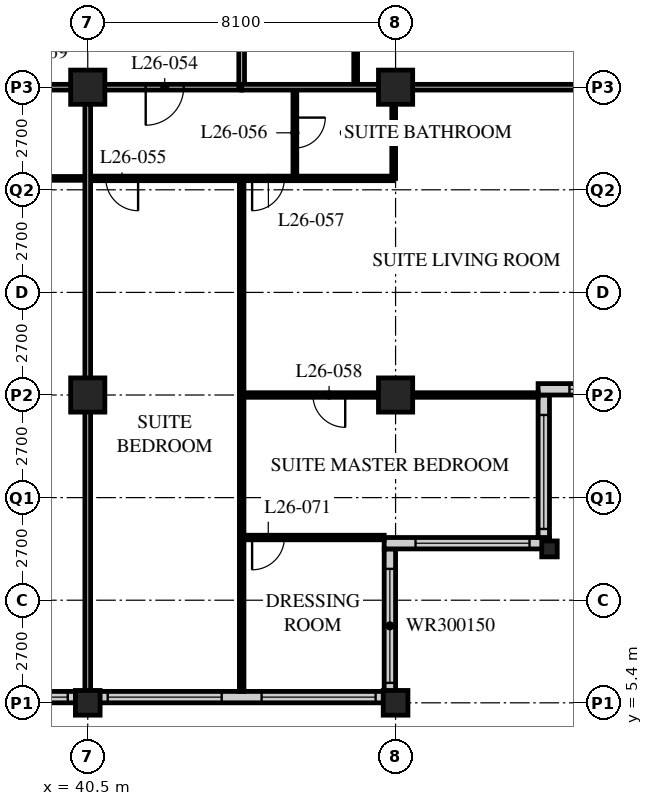
"""IFC4 building model, lengths in metres.
Left out: names, types, materials, properties, quantities, classifications, styles, units other than length and angle.
Written with IfcOpenShell. Run it as: python <this file> out.ifc"""

import sys

from ifc_helpers import new_model, si_unit, direction, frame, frame_2d, origin, origin_2d, place, context, subcontext, project, spatial, rectangle, hollow_rectangle, i_section, extrude, element, fill, save


model = new_model("IFC4")
c1 = context("Model", 3, precision=1e-05, world=origin(), true_north=direction((0.0, 1.0)))
c2 = subcontext(c1, "Body", "Model", "MODEL_VIEW")
j1 = project(units=[si_unit("LENGTHUNIT", "METRE"), si_unit("PLANEANGLEUNIT", "RADIAN")], contexts=[c1])
p1 = place(None, origin())
s1 = spatial("IfcSite", under=j1, at=p1, CompositionType="ELEMENT")
p2 = place(p1, origin())
s2 = spatial("IfcBuilding", under=s1, at=p2, CompositionType="ELEMENT")
p3 = place(p2, frame((0.0, 0.0, 106.8)))
s3 = spatial("IfcBuildingStorey", under=s2, at=p3, CompositionType="ELEMENT", Elevation=106.8)
p4 = place(p3, frame((40.5, 5.4, 0.0), z_axis=(0.0, 0.0, 1.0), x_axis=(1.0, 0.0, 0.0)))
e1 = element("IfcColumn", 1, at=p4, inside=s3, PredefinedType="COLUMN", context=c2, shape_type="SweptSolid", body=[
    extrude(hollow_rectangle(XDim=0.65, YDim=0.65, WallThickness=0.055, at=origin_2d()), origin(), (0.0, 0.0, 1.0), 3.4),
])
for number, where, z_axis, x_axis in (
    (2, (40.5, 13.5, 0.0), (0.0, 0.0, 1.0), (1.0, 0.0, 0.0)),
    (3, (40.5, 21.6, 0.0), (0.0, 0.0, 1.0), (1.0, 0.0, 0.0)),
):
    element("IfcColumn", number, at=place(p3, frame(where, z_axis=z_axis, x_axis=x_axis)), inside=s3, PredefinedType="COLUMN", context=c2, shape_type="SweptSolid", body=[
        extrude(hollow_rectangle(XDim=0.9, YDim=0.9, WallThickness=0.09, at=origin_2d()), origin(), (0.0, 0.0, 1.0), 3.4),
    ])
p5 = place(p3, frame((48.6, 5.4, 0.0), z_axis=(0.0, 0.0, 1.0), x_axis=(1.0, 0.0, 0.0)))
e4 = element("IfcColumn", 4, at=p5, inside=s3, PredefinedType="COLUMN", context=c2, shape_type="SweptSolid", body=[
    extrude(hollow_rectangle(XDim=0.65, YDim=0.65, WallThickness=0.055, at=origin_2d()), origin(), (0.0, 0.0, 1.0), 3.4),
])
for number, where, z_axis, x_axis in (
    (5, (48.6, 13.5, 0.0), (0.0, 0.0, 1.0), (1.0, 0.0, 0.0)),
    (6, (48.6, 21.6, 0.0), (0.0, 0.0, 1.0), (1.0, 0.0, 0.0)),
):
    element("IfcColumn", number, at=place(p3, frame(where, z_axis=z_axis, x_axis=x_axis)), inside=s3, PredefinedType="COLUMN", context=c2, shape_type="SweptSolid", body=[
        extrude(hollow_rectangle(XDim=0.9, YDim=0.9, WallThickness=0.09, at=origin_2d()), origin(), (0.0, 0.0, 1.0), 3.4),
    ])
p6 = place(p3, frame((52.65, 9.45, 0.0), z_axis=(0.0, 0.0, 1.0), x_axis=(1.0, 0.0, 0.0)))
e7 = element("IfcColumn", 7, at=p6, inside=s3, PredefinedType="COLUMN", context=c2, shape_type="SweptSolid", body=[
    extrude(i_section(OverallWidth=0.407, OverallDepth=0.419, WebThickness=0.031, FlangeThickness=0.049, FilletRadius=0.015, at=origin_2d()), origin(), (0.0, 0.0, 1.0), 3.4),
])
p7 = place(p3, frame((8.4, 5.55, 0.0), z_axis=(0.0, 0.0, 1.0), x_axis=(1.0, 0.0, 0.0)))
e8 = element("IfcWall", 8, at=p7, inside=s3, PredefinedType="SOLIDWALL", context=c2, shape_type="SweptSolid", body=[
    extrude(rectangle(XDim=40.2, YDim=0.3, at=frame_2d((20.1, 0.0))), origin(), (0.0, 0.0, 1.0), 3.19),
])
p8 = place(p7, frame((0.225, 0.0, 0.9)))
e9 = element("IfcOpeningElement", 9, at=p8, cuts=e8, PredefinedType="OPENING", context=c2, shape_type="SweptSolid", body=[
    extrude(rectangle(XDim=3.0, YDim=2.0, at=frame_2d((1.5, 1.0))), frame((0.0, 0.16, 0.0), z_axis=(0.0, -1.0, 0.0), x_axis=(1.0, 0.0, 0.0)), (0.0, 0.0, 1.0), 0.32),
])
p9 = place(p7, frame((4.275, 0.0, 0.9)))
e10 = element("IfcOpeningElement", 10, at=p9, cuts=e8, PredefinedType="OPENING", context=c2, shape_type="SweptSolid", body=[
    extrude(rectangle(XDim=3.0, YDim=2.0, at=frame_2d((1.5, 1.0))), frame((0.0, 0.16, 0.0), z_axis=(0.0, -1.0, 0.0), x_axis=(1.0, 0.0, 0.0)), (0.0, 0.0, 1.0), 0.32),
])
p10 = place(p7, frame((8.325, 0.0, 0.9)))
e11 = element("IfcOpeningElement", 11, at=p10, cuts=e8, PredefinedType="OPENING", context=c2, shape_type="SweptSolid", body=[
    extrude(rectangle(XDim=3.0, YDim=2.0, at=frame_2d((1.5, 1.0))), frame((0.0, 0.16, 0.0), z_axis=(0.0, -1.0, 0.0), x_axis=(1.0, 0.0, 0.0)), (0.0, 0.0, 1.0), 0.32),
])
p11 = place(p7, frame((12.375, 0.0, 0.9)))
e12 = element("IfcOpeningElement", 12, at=p11, cuts=e8, PredefinedType="OPENING", context=c2, shape_type="SweptSolid", body=[
    extrude(rectangle(XDim=3.0, YDim=2.0, at=frame_2d((1.5, 1.0))), frame((0.0, 0.16, 0.0), z_axis=(0.0, -1.0, 0.0), x_axis=(1.0, 0.0, 0.0)), (0.0, 0.0, 1.0), 0.32),
])
p12 = place(p7, frame((16.425, 0.0, 0.9)))
e13 = element("IfcOpeningElement", 13, at=p12, cuts=e8, PredefinedType="OPENING", context=c2, shape_type="SweptSolid", body=[
    extrude(rectangle(XDim=3.0, YDim=2.0, at=frame_2d((1.5, 1.0))), frame((0.0, 0.16, 0.0), z_axis=(0.0, -1.0, 0.0), x_axis=(1.0, 0.0, 0.0)), (0.0, 0.0, 1.0), 0.32),
])
p13 = place(p7, frame((20.475, 0.0, 0.9)))
e14 = element("IfcOpeningElement", 14, at=p13, cuts=e8, PredefinedType="OPENING", context=c2, shape_type="SweptSolid", body=[
    extrude(rectangle(XDim=3.0, YDim=2.0, at=frame_2d((1.5, 1.0))), frame((0.0, 0.16, 0.0), z_axis=(0.0, -1.0, 0.0), x_axis=(1.0, 0.0, 0.0)), (0.0, 0.0, 1.0), 0.32),
])
p14 = place(p7, frame((24.525, 0.0, 0.9)))
e15 = element("IfcOpeningElement", 15, at=p14, cuts=e8, PredefinedType="OPENING", context=c2, shape_type="SweptSolid", body=[
    extrude(rectangle(XDim=3.0, YDim=2.0, at=frame_2d((1.5, 1.0))), frame((0.0, 0.16, 0.0), z_axis=(0.0, -1.0, 0.0), x_axis=(1.0, 0.0, 0.0)), (0.0, 0.0, 1.0), 0.32),
])
p15 = place(p7, frame((28.575, 0.0, 0.9)))
e16 = element("IfcOpeningElement", 16, at=p15, cuts=e8, PredefinedType="OPENING", context=c2, shape_type="SweptSolid", body=[
    extrude(rectangle(XDim=3.0, YDim=2.0, at=frame_2d((1.5, 1.0))), frame((0.0, 0.16, 0.0), z_axis=(0.0, -1.0, 0.0), x_axis=(1.0, 0.0, 0.0)), (0.0, 0.0, 1.0), 0.32),
])
p16 = place(p7, frame((32.625, 0.0, 0.9)))
e17 = element("IfcOpeningElement", 17, at=p16, cuts=e8, PredefinedType="OPENING", context=c2, shape_type="SweptSolid", body=[
    extrude(rectangle(XDim=3.0, YDim=2.0, at=frame_2d((1.5, 1.0))), frame((0.0, 0.16, 0.0), z_axis=(0.0, -1.0, 0.0), x_axis=(1.0, 0.0, 0.0)), (0.0, 0.0, 1.0), 0.32),
])
p17 = place(p7, frame((36.675, 0.0, 0.9)))
e18 = element("IfcOpeningElement", 18, at=p17, cuts=e8, PredefinedType="OPENING", context=c2, shape_type="SweptSolid", body=[
    extrude(rectangle(XDim=3.0, YDim=2.0, at=frame_2d((1.5, 1.0))), frame((0.0, 0.16, 0.0), z_axis=(0.0, -1.0, 0.0), x_axis=(1.0, 0.0, 0.0)), (0.0, 0.0, 1.0), 0.32),
])
p18 = place(p3, frame((48.45, 5.7, 0.0), z_axis=(0.0, 0.0, 1.0), x_axis=(0.0, 1.0, 0.0)))
e19 = element("IfcWall", 19, at=p18, inside=s3, PredefinedType="SOLIDWALL", context=c2, shape_type="SweptSolid", body=[
    extrude(rectangle(XDim=3.75, YDim=0.3, at=frame_2d((1.875, 0.0))), origin(), (0.0, 0.0, 1.0), 3.19),
])
p19 = place(p18, frame((0.225, 0.0, 0.9)))
e20 = element("IfcOpeningElement", 20, at=p19, cuts=e19, PredefinedType="OPENING", context=c2, shape_type="SweptSolid", body=[
    extrude(rectangle(XDim=3.0, YDim=1.5, at=frame_2d((1.5, 0.75))), frame((0.0, 0.16, 0.0), z_axis=(0.0, -1.0, 0.0), x_axis=(1.0, 0.0, 0.0)), (0.0, 0.0, 1.0), 0.32),
])
p20 = place(p3, frame((48.3, 9.6, 0.0), z_axis=(0.0, 0.0, 1.0), x_axis=(1.0, 0.0, 0.0)))
e21 = element("IfcWall", 21, at=p20, inside=s3, PredefinedType="SOLIDWALL", context=c2, shape_type="SweptSolid", body=[
    extrude(rectangle(XDim=4.35, YDim=0.3, at=frame_2d((2.175, 0.0))), origin(), (0.0, 0.0, 1.0), 3.19),
])
p21 = place(p20, frame((0.825, 0.0, 0.9)))
e22 = element("IfcOpeningElement", 22, at=p21, cuts=e21, PredefinedType="OPENING", context=c2, shape_type="SweptSolid", body=[
    extrude(rectangle(XDim=3.0, YDim=1.5, at=frame_2d((1.5, 0.75))), frame((0.0, 0.16, 0.0), z_axis=(0.0, -1.0, 0.0), x_axis=(1.0, 0.0, 0.0)), (0.0, 0.0, 1.0), 0.32),
])
p22 = place(p3, frame((52.5, 9.75, 0.0), z_axis=(0.0, 0.0, 1.0), x_axis=(0.0, 1.0, 0.0)))
e23 = element("IfcWall", 23, at=p22, inside=s3, PredefinedType="SOLIDWALL", context=c2, shape_type="SweptSolid", body=[
    extrude(rectangle(XDim=3.75, YDim=0.3, at=frame_2d((1.875, 0.0))), origin(), (0.0, 0.0, 1.0), 3.19),
])
p23 = place(p22, frame((0.225, 0.0, 0.9)))
e24 = element("IfcOpeningElement", 24, at=p23, cuts=e23, PredefinedType="OPENING", context=c2, shape_type="SweptSolid", body=[
    extrude(rectangle(XDim=3.0, YDim=1.5, at=frame_2d((1.5, 0.75))), frame((0.0, 0.16, 0.0), z_axis=(0.0, -1.0, 0.0), x_axis=(1.0, 0.0, 0.0)), (0.0, 0.0, 1.0), 0.32),
])
p24 = place(p3, frame((52.35, 13.65, 0.0), z_axis=(0.0, 0.0, 1.0), x_axis=(1.0, 0.0, 0.0)))
e25 = element("IfcWall", 25, at=p24, inside=s3, PredefinedType="SOLIDWALL", context=c2, shape_type="SweptSolid", body=[
    extrude(rectangle(XDim=4.35, YDim=0.3, at=frame_2d((2.175, 0.0))), origin(), (0.0, 0.0, 1.0), 3.19),
])
p25 = place(p24, frame((0.825, 0.0, 0.9)))
e26 = element("IfcOpeningElement", 26, at=p25, cuts=e25, PredefinedType="OPENING", context=c2, shape_type="SweptSolid", body=[
    extrude(rectangle(XDim=3.0, YDim=1.5, at=frame_2d((1.5, 0.75))), frame((0.0, 0.16, 0.0), z_axis=(0.0, -1.0, 0.0), x_axis=(1.0, 0.0, 0.0)), (0.0, 0.0, 1.0), 0.32),
])
p26 = place(p3, frame((12.15, 21.6, 0.0), z_axis=(0.0, 0.0, 1.0), x_axis=(1.0, 0.0, 0.0)))
e27 = element("IfcWall", 27, at=p26, inside=s3, PredefinedType="PARTITIONING", context=c2, shape_type="SweptSolid", body=[
    extrude(rectangle(XDim=32.4, YDim=0.15, at=frame_2d((16.2, 0.0))), origin(), (0.0, 0.0, 1.0), 2.578),
])
p27 = place(p26, frame((5.95, 0.0, 0.0)))
e28 = element("IfcOpeningElement", 28, at=p27, cuts=e27, PredefinedType="OPENING", context=c2, shape_type="SweptSolid", body=[
    extrude(rectangle(XDim=1.0, YDim=2.1, at=frame_2d((0.5, 1.05))), frame((0.0, 0.085, 0.0), z_axis=(0.0, -1.0, 0.0), x_axis=(1.0, 0.0, 0.0)), (0.0, 0.0, 1.0), 0.17),
])
p28 = place(p26, frame((14.05, 0.0, 0.0)))
e29 = element("IfcOpeningElement", 29, at=p28, cuts=e27, PredefinedType="OPENING", context=c2, shape_type="SweptSolid", body=[
    extrude(rectangle(XDim=1.0, YDim=2.1, at=frame_2d((0.5, 1.05))), frame((0.0, 0.085, 0.0), z_axis=(0.0, -1.0, 0.0), x_axis=(1.0, 0.0, 0.0)), (0.0, 0.0, 1.0), 0.17),
])
p29 = place(p26, frame((22.15, 0.0, 0.0)))
e30 = element("IfcOpeningElement", 30, at=p29, cuts=e27, PredefinedType="OPENING", context=c2, shape_type="SweptSolid", body=[
    extrude(rectangle(XDim=1.0, YDim=2.1, at=frame_2d((0.5, 1.05))), frame((0.0, 0.085, 0.0), z_axis=(0.0, -1.0, 0.0), x_axis=(1.0, 0.0, 0.0)), (0.0, 0.0, 1.0), 0.17),
])
p30 = place(p26, frame((1.525, 0.0, 0.0)))
e31 = element("IfcOpeningElement", 31, at=p30, cuts=e27, PredefinedType="OPENING", context=c2, shape_type="SweptSolid", body=[
    extrude(rectangle(XDim=1.0, YDim=2.1, at=frame_2d((0.5, 1.05))), frame((0.0, 0.085, 0.0), z_axis=(0.0, -1.0, 0.0), x_axis=(1.0, 0.0, 0.0)), (0.0, 0.0, 1.0), 0.17),
])
p31 = place(p26, frame((29.875, 0.0, 0.0)))
e32 = element("IfcOpeningElement", 32, at=p31, cuts=e27, PredefinedType="OPENING", context=c2, shape_type="SweptSolid", body=[
    extrude(rectangle(XDim=1.0, YDim=2.1, at=frame_2d((0.5, 1.05))), frame((0.0, 0.085, 0.0), z_axis=(0.0, -1.0, 0.0), x_axis=(1.0, 0.0, 0.0)), (0.0, 0.0, 1.0), 0.17),
])
p32 = place(p3, frame((44.55, 21.6, 0.0), z_axis=(0.0, 0.0, 1.0), x_axis=(0.0, 1.0, 0.0)))
e33 = element("IfcWall", 33, at=p32, inside=s3, PredefinedType="PARTITIONING", context=c2, shape_type="SweptSolid", body=[
    extrude(rectangle(XDim=24.3, YDim=0.15, at=frame_2d((12.15, 0.0))), origin(), (0.0, 0.0, 1.0), 3.19),
])
p33 = place(p32, frame((2.75, 0.0, 0.0)))
e34 = element("IfcOpeningElement", 34, at=p33, cuts=e33, PredefinedType="OPENING", context=c2, shape_type="SweptSolid", body=[
    extrude(rectangle(XDim=1.0, YDim=2.1, at=frame_2d((0.5, 1.05))), frame((0.0, 0.085, 0.0), z_axis=(0.0, -1.0, 0.0), x_axis=(1.0, 0.0, 0.0)), (0.0, 0.0, 1.0), 0.17),
])
p34 = place(p32, frame((6.5, 0.0, 0.0)))
e35 = element("IfcOpeningElement", 35, at=p34, cuts=e33, PredefinedType="OPENING", context=c2, shape_type="SweptSolid", body=[
    extrude(rectangle(XDim=1.0, YDim=2.1, at=frame_2d((0.5, 1.05))), frame((0.0, 0.085, 0.0), z_axis=(0.0, -1.0, 0.0), x_axis=(1.0, 0.0, 0.0)), (0.0, 0.0, 1.0), 0.17),
])
p35 = place(p32, frame((13.55, 0.0, 0.0)))
e36 = element("IfcOpeningElement", 36, at=p35, cuts=e33, PredefinedType="OPENING", context=c2, shape_type="SweptSolid", body=[
    extrude(rectangle(XDim=1.0, YDim=2.1, at=frame_2d((0.5, 1.05))), frame((0.0, 0.085, 0.0), z_axis=(0.0, -1.0, 0.0), x_axis=(1.0, 0.0, 0.0)), (0.0, 0.0, 1.0), 0.17),
])
p36 = place(p32, frame((21.65, 0.0, 0.0)))
e37 = element("IfcOpeningElement", 37, at=p36, cuts=e33, PredefinedType="OPENING", context=c2, shape_type="SweptSolid", body=[
    extrude(rectangle(XDim=1.0, YDim=2.1, at=frame_2d((0.5, 1.05))), frame((0.0, 0.085, 0.0), z_axis=(0.0, -1.0, 0.0), x_axis=(1.0, 0.0, 0.0)), (0.0, 0.0, 1.0), 0.17),
])
p37 = place(p3, frame((37.9, 19.2, 0.0), z_axis=(0.0, 0.0, 1.0), x_axis=(1.0, 0.0, 0.0)))
e38 = element("IfcWall", 38, at=p37, inside=s3, PredefinedType="PARTITIONING", context=c2, shape_type="SweptSolid", body=[
    extrude(rectangle(XDim=2.6, YDim=0.1, at=frame_2d((1.3, 0.0))), origin(), (0.0, 0.0, 1.0), 3.19),
])
p38 = place(p3, frame((47.55, 21.6, 0.0), z_axis=(0.0, 0.0, 1.0), x_axis=(0.0, 1.0, 0.0)))
e39 = element("IfcWall", 39, at=p38, inside=s3, PredefinedType="PARTITIONING", context=c2, shape_type="SweptSolid", body=[
    extrude(rectangle(XDim=2.6, YDim=0.1, at=frame_2d((1.3, 0.0))), origin(), (0.0, 0.0, 1.0), 3.19),
])
p39 = place(p3, frame((40.5, 19.2, 0.0), z_axis=(0.0, 0.0, 1.0), x_axis=(1.0, 0.0, 0.0)))
e40 = element("IfcWall", 40, at=p39, inside=s3, PredefinedType="PARTITIONING", context=c2, shape_type="SweptSolid", body=[
    extrude(rectangle(XDim=8.05, YDim=0.12, at=frame_2d((4.025, 0.0))), origin(), (0.0, 0.0, 1.0), 3.19),
])
p40 = place(p39, frame((0.475, 0.0, 0.0)))
e41 = element("IfcOpeningElement", 41, at=p40, cuts=e40, PredefinedType="OPENING", context=c2, shape_type="SweptSolid", body=[
    extrude(rectangle(XDim=0.85, YDim=2.1, at=frame_2d((0.425, 1.05))), frame((0.0, 0.07, 0.0), z_axis=(0.0, -1.0, 0.0), x_axis=(1.0, 0.0, 0.0)), (0.0, 0.0, 1.0), 0.14),
])
p41 = place(p39, frame((4.325, 0.0, 0.0)))
e42 = element("IfcOpeningElement", 42, at=p41, cuts=e40, PredefinedType="OPENING", context=c2, shape_type="SweptSolid", body=[
    extrude(rectangle(XDim=0.85, YDim=2.1, at=frame_2d((0.425, 1.05))), frame((0.0, 0.07, 0.0), z_axis=(0.0, -1.0, 0.0), x_axis=(1.0, 0.0, 0.0)), (0.0, 0.0, 1.0), 0.14),
])
p42 = place(p3, frame((45.95, 21.6, 0.0), z_axis=(0.0, 0.0, 1.0), x_axis=(0.0, -1.0, 0.0)))
e43 = element("IfcWall", 43, at=p42, inside=s3, PredefinedType="PARTITIONING", context=c2, shape_type="SweptSolid", body=[
    extrude(rectangle(XDim=2.4, YDim=0.1, at=frame_2d((1.2, 0.0))), origin(), (0.0, 0.0, 1.0), 3.19),
])
p43 = place(p42, frame((0.8, 0.0, 0.0)))
e44 = element("IfcOpeningElement", 44, at=p43, cuts=e43, PredefinedType="OPENING", context=c2, shape_type="SweptSolid", body=[
    extrude(rectangle(XDim=0.8, YDim=2.1, at=frame_2d((0.4, 1.05))), frame((0.0, 0.06, 0.0), z_axis=(0.0, -1.0, 0.0), x_axis=(1.0, 0.0, 0.0)), (0.0, 0.0, 1.0), 0.12),
])
p44 = place(p3, frame((48.55, 21.6, 0.0), z_axis=(0.0, 0.0, 1.0), x_axis=(0.0, -1.0, 0.0)))
e45 = element("IfcWall", 45, at=p44, inside=s3, PredefinedType="PARTITIONING", context=c2, shape_type="SweptSolid", body=[
    extrude(rectangle(XDim=2.4, YDim=0.1, at=frame_2d((1.2, 0.0))), origin(), (0.0, 0.0, 1.0), 2.578),
])
p45 = place(p3, frame((44.55, 19.2, 0.0), z_axis=(0.0, 0.0, 1.0), x_axis=(0.0, -1.0, 0.0)))
e46 = element("IfcWall", 46, at=p45, inside=s3, PredefinedType="PARTITIONING", context=c2, shape_type="SweptSolid", body=[
    extrude(rectangle(XDim=13.5, YDim=0.12, at=frame_2d((6.75, 0.0))), origin(), (0.0, 0.0, 1.0), 3.19),
])
p46 = place(p3, frame((44.55, 13.5, 0.0), z_axis=(0.0, 0.0, 1.0), x_axis=(1.0, 0.0, 0.0)))
e47 = element("IfcWall", 47, at=p46, inside=s3, PredefinedType="PARTITIONING", context=c2, shape_type="SweptSolid", body=[
    extrude(rectangle(XDim=7.8, YDim=0.12, at=frame_2d((3.9, 0.0))), origin(), (0.0, 0.0, 1.0), 2.578),
])
p47 = place(p46, frame((1.875, 0.0, 0.0)))
e48 = element("IfcOpeningElement", 48, at=p47, cuts=e47, PredefinedType="OPENING", context=c2, shape_type="SweptSolid", body=[
    extrude(rectangle(XDim=0.85, YDim=2.1, at=frame_2d((0.425, 1.05))), frame((0.0, 0.07, 0.0), z_axis=(0.0, -1.0, 0.0), x_axis=(1.0, 0.0, 0.0)), (0.0, 0.0, 1.0), 0.14),
])
p48 = place(p3, frame((44.55, 21.6, 0.0), z_axis=(0.0, 0.0, 1.0), x_axis=(1.0, 0.0, 0.0)))
e49 = element("IfcWall", 49, at=p48, inside=s3, PredefinedType="PARTITIONING", context=c2, shape_type="SweptSolid", body=[
    extrude(rectangle(XDim=11.85, YDim=0.15, at=frame_2d((5.925, 0.0))), origin(), (0.0, 0.0, 1.0), 2.578),
])
p49 = place(p3, frame((40.5, 21.6, 0.0), z_axis=(0.0, 0.0, 1.0), x_axis=(0.0, -1.0, 0.0)))
e50 = element("IfcWall", 50, at=p49, inside=s3, PredefinedType="PARTITIONING", context=c2, shape_type="SweptSolid", body=[
    extrude(rectangle(XDim=15.9, YDim=0.15, at=frame_2d((7.95, 0.0))), origin(), (0.0, 0.0, 1.0), 2.578),
])
p50 = place(p3, frame((44.55, 9.75, 0.0), z_axis=(0.0, 0.0, 1.0), x_axis=(1.0, 0.0, 0.0)))
e51 = element("IfcWall", 51, at=p50, inside=s3, PredefinedType="PARTITIONING", context=c2, shape_type="SweptSolid", body=[
    extrude(rectangle(XDim=3.75, YDim=0.12, at=frame_2d((1.875, 0.0))), origin(), (0.0, 0.0, 1.0), 3.19),
])
p51 = place(p50, frame((0.275, 0.0, 0.0)))
e52 = element("IfcOpeningElement", 52, at=p51, cuts=e51, PredefinedType="OPENING", context=c2, shape_type="SweptSolid", body=[
    extrude(rectangle(XDim=0.85, YDim=2.1, at=frame_2d((0.425, 1.05))), frame((0.0, 0.07, 0.0), z_axis=(0.0, -1.0, 0.0), x_axis=(1.0, 0.0, 0.0)), (0.0, 0.0, 1.0), 0.14),
])
p52 = place(p15, origin())
e53 = element("IfcWindow", 53, at=p52, inside=s3, PartitioningType="SINGLE_PANEL", PredefinedType="WINDOW", context=c2, shape_type="SweptSolid", body=[
    extrude(rectangle(XDim=3.0, YDim=2.0, at=frame_2d((1.5, 1.0))), frame((0.0, 0.03, 0.0), z_axis=(0.0, -1.0, 0.0), x_axis=(1.0, 0.0, 0.0)), (0.0, 0.0, 1.0), 0.06),
])
fill(e16, e53)
p53 = place(p16, origin())
e54 = element("IfcWindow", 54, at=p53, inside=s3, PartitioningType="SINGLE_PANEL", PredefinedType="WINDOW", context=c2, shape_type="SweptSolid", body=[
    extrude(rectangle(XDim=3.0, YDim=2.0, at=frame_2d((1.5, 1.0))), frame((0.0, 0.03, 0.0), z_axis=(0.0, -1.0, 0.0), x_axis=(1.0, 0.0, 0.0)), (0.0, 0.0, 1.0), 0.06),
])
fill(e17, e54)
p54 = place(p17, origin())
e55 = element("IfcWindow", 55, at=p54, inside=s3, PartitioningType="SINGLE_PANEL", PredefinedType="WINDOW", context=c2, shape_type="SweptSolid", body=[
    extrude(rectangle(XDim=3.0, YDim=2.0, at=frame_2d((1.5, 1.0))), frame((0.0, 0.03, 0.0), z_axis=(0.0, -1.0, 0.0), x_axis=(1.0, 0.0, 0.0)), (0.0, 0.0, 1.0), 0.06),
])
fill(e18, e55)
p55 = place(p19, origin())
e56 = element("IfcWindow", 56, at=p55, inside=s3, PartitioningType="SINGLE_PANEL", PredefinedType="WINDOW", context=c2, shape_type="SweptSolid", body=[
    extrude(rectangle(XDim=3.0, YDim=1.5, at=frame_2d((1.5, 0.75))), frame((0.0, 0.03, 0.0), z_axis=(0.0, -1.0, 0.0), x_axis=(1.0, 0.0, 0.0)), (0.0, 0.0, 1.0), 0.06),
])
fill(e20, e56)
p56 = place(p21, origin())
e57 = element("IfcWindow", 57, at=p56, inside=s3, PartitioningType="SINGLE_PANEL", PredefinedType="WINDOW", context=c2, shape_type="SweptSolid", body=[
    extrude(rectangle(XDim=3.0, YDim=1.5, at=frame_2d((1.5, 0.75))), frame((0.0, 0.03, 0.0), z_axis=(0.0, -1.0, 0.0), x_axis=(1.0, 0.0, 0.0)), (0.0, 0.0, 1.0), 0.06),
])
fill(e22, e57)
p57 = place(p23, origin())
e58 = element("IfcWindow", 58, at=p57, inside=s3, PartitioningType="SINGLE_PANEL", PredefinedType="WINDOW", context=c2, shape_type="SweptSolid", body=[
    extrude(rectangle(XDim=3.0, YDim=1.5, at=frame_2d((1.5, 0.75))), frame((0.0, 0.03, 0.0), z_axis=(0.0, -1.0, 0.0), x_axis=(1.0, 0.0, 0.0)), (0.0, 0.0, 1.0), 0.06),
])
fill(e24, e58)
p58 = place(p25, origin())
e59 = element("IfcWindow", 59, at=p58, inside=s3, PartitioningType="SINGLE_PANEL", PredefinedType="WINDOW", context=c2, shape_type="SweptSolid", body=[
    extrude(rectangle(XDim=3.0, YDim=1.5, at=frame_2d((1.5, 0.75))), frame((0.0, 0.03, 0.0), z_axis=(0.0, -1.0, 0.0), x_axis=(1.0, 0.0, 0.0)), (0.0, 0.0, 1.0), 0.06),
])
fill(e26, e59)
p59 = place(p31, origin())
e60 = element("IfcDoor", 60, at=p59, inside=s3, OperationType="SINGLE_SWING_RIGHT", PredefinedType="DOOR", context=c2, shape_type="SweptSolid", body=[
    extrude(rectangle(XDim=1.0, YDim=2.1, at=frame_2d((0.5, 1.05))), frame((0.0, 0.025, 0.0), z_axis=(0.0, -1.0, 0.0), x_axis=(1.0, 0.0, 0.0)), (0.0, 0.0, 1.0), 0.05),
])
fill(e32, e60)
p60 = place(p40, origin())
e61 = element("IfcDoor", 61, at=p60, inside=s3, OperationType="SINGLE_SWING_LEFT", PredefinedType="DOOR", context=c2, shape_type="SweptSolid", body=[
    extrude(rectangle(XDim=0.85, YDim=2.1, at=frame_2d((0.425, 1.05))), frame((0.0, 0.025, 0.0), z_axis=(0.0, -1.0, 0.0), x_axis=(1.0, 0.0, 0.0)), (0.0, 0.0, 1.0), 0.05),
])
fill(e41, e61)
p61 = place(p43, origin())
e62 = element("IfcDoor", 62, at=p61, inside=s3, OperationType="SINGLE_SWING_LEFT", PredefinedType="DOOR", context=c2, shape_type="SweptSolid", body=[
    extrude(rectangle(XDim=0.8, YDim=2.1, at=frame_2d((0.4, 1.05))), frame((0.0, 0.025, 0.0), z_axis=(0.0, -1.0, 0.0), x_axis=(1.0, 0.0, 0.0)), (0.0, 0.0, 1.0), 0.05),
])
fill(e44, e62)
p62 = place(p41, origin())
e63 = element("IfcDoor", 63, at=p62, inside=s3, OperationType="SINGLE_SWING_RIGHT", PredefinedType="DOOR", context=c2, shape_type="SweptSolid", body=[
    extrude(rectangle(XDim=0.85, YDim=2.1, at=frame_2d((0.425, 1.05))), frame((0.0, 0.025, 0.0), z_axis=(0.0, -1.0, 0.0), x_axis=(1.0, 0.0, 0.0)), (0.0, 0.0, 1.0), 0.05),
])
fill(e42, e63)
p63 = place(p47, origin())
e64 = element("IfcDoor", 64, at=p63, inside=s3, OperationType="SINGLE_SWING_LEFT", PredefinedType="DOOR", context=c2, shape_type="SweptSolid", body=[
    extrude(rectangle(XDim=0.85, YDim=2.1, at=frame_2d((0.425, 1.05))), frame((0.0, 0.025, 0.0), z_axis=(0.0, -1.0, 0.0), x_axis=(1.0, 0.0, 0.0)), (0.0, 0.0, 1.0), 0.05),
])
fill(e48, e64)
p64 = place(p51, origin())
e65 = element("IfcDoor", 65, at=p64, inside=s3, OperationType="SINGLE_SWING_RIGHT", PredefinedType="DOOR", context=c2, shape_type="SweptSolid", body=[
    extrude(rectangle(XDim=0.85, YDim=2.1, at=frame_2d((0.425, 1.05))), frame((0.0, 0.025, 0.0), z_axis=(0.0, -1.0, 0.0), x_axis=(1.0, 0.0, 0.0)), (0.0, 0.0, 1.0), 0.05),
])
fill(e52, e65)
save(model, sys.argv[1])
